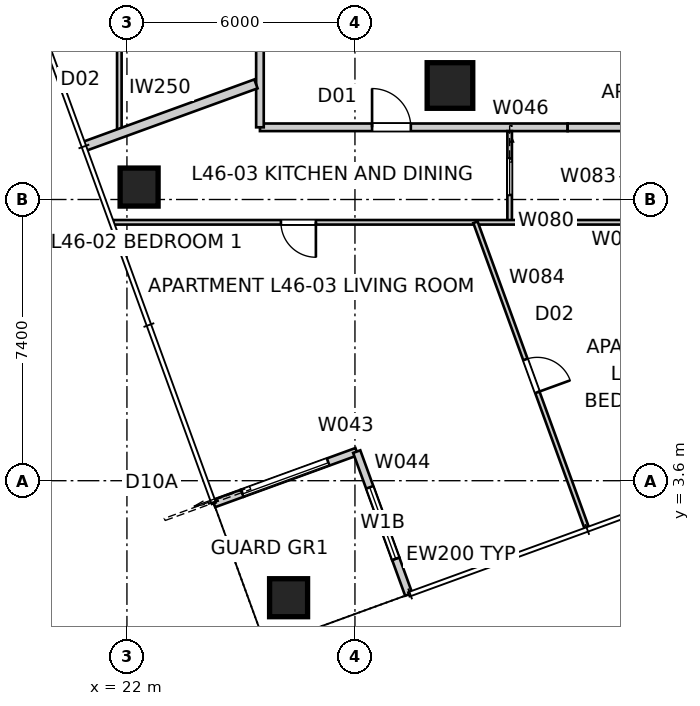
"""IFC4 building model, lengths in metres.
Left out: names, types, materials, properties, quantities, classifications, styles, units other than length and angle.
Written with IfcOpenShell. Run it as: python <this file> out.ifc"""

import sys

from ifc_helpers import new_model, si_unit, direction, frame, frame_2d, origin, origin_2d, place, context, subcontext, project, spatial, rectangle, extrude, element, fill, save


model = new_model("IFC4")
c1 = context("Model", 3, precision=1e-05, world=origin(), true_north=direction((0.0, 1.0)))
c2 = subcontext(c1, "Body", "Model", "MODEL_VIEW")
j1 = project(units=[si_unit("LENGTHUNIT", "METRE"), si_unit("PLANEANGLEUNIT", "RADIAN")], contexts=[c1])
p1 = place(None, origin())
s1 = spatial("IfcSite", under=j1, at=p1, CompositionType="ELEMENT")
p2 = place(p1, origin())
s2 = spatial("IfcBuilding", under=s1, at=p2, CompositionType="ELEMENT")
p3 = place(p2, frame((0.0, 0.0, 167.6)))
s3 = spatial("IfcBuildingStorey", under=s2, at=p3, CompositionType="ELEMENT", Elevation=167.6)
for number, where, z_axis, x_axis in (
    (1, (26.253, 0.521, 0.0), (0.0, 0.0, 1.0), (1.0, 0.0, 0.0)),
    (2, (22.32, 11.327, 0.0), (0.0, 0.0, 1.0), (1.0, 0.0, 0.0)),
):
    element("IfcColumn", number, at=place(p3, frame(where, z_axis=z_axis, x_axis=x_axis)), inside=s3, PredefinedType="COLUMN", context=c2, shape_type="SweptSolid", body=[
        extrude(rectangle(XDim=1.0, YDim=1.0, at=origin_2d()), origin(), (0.0, 0.0, 1.0), 3.2),
    ])
p4 = place(p3, frame((30.5, 14.0, 0.0), z_axis=(0.0, 0.0, 1.0), x_axis=(1.0, 0.0, 0.0)))
e3 = element("IfcColumn", 3, at=p4, inside=s3, PredefinedType="COLUMN", context=c2, shape_type="SweptSolid", body=[
    extrude(rectangle(XDim=1.2, YDim=1.2, at=origin_2d()), origin(), (0.0, 0.0, 1.0), 3.4),
])
p5 = place(p3, frame((24.288, 2.998, 0.0), z_axis=(0.0, 0.0, 1.0), x_axis=(0.939659694648, 0.342110593602, 0.0)))
e4 = element("IfcWall", 4, at=p5, inside=s3, PredefinedType="SOLIDWALL", context=c2, shape_type="SweptSolid", body=[
    extrude(rectangle(XDim=0.8, YDim=0.2, at=frame_2d((0.4, 0.0))), origin(), (0.0, 0.0, 1.0), 3.2),
])
p6 = place(p3, frame((25.04, 3.271, 0.0), z_axis=(0.0, 0.0, 1.0), x_axis=(0.939693144909, 0.342018703306, 0.0)))
e5 = element("IfcWall", 5, at=p6, inside=s3, PredefinedType="SOLIDWALL", context=c2, shape_type="SweptSolid", body=[
    extrude(rectangle(XDim=3.2, YDim=0.2, at=frame_2d((1.6, 0.0))), origin(), (0.0, 0.0, 1.0), 2.588),
])
p7 = place(p6, origin())
e6 = element("IfcOpeningElement", 6, at=p7, cuts=e5, PredefinedType="OPENING", context=c2, shape_type="SweptSolid", body=[
    extrude(rectangle(XDim=2.4, YDim=2.1, at=frame_2d((1.2, 1.05))), frame((0.0, 0.11, 0.0), z_axis=(0.0, -1.0, 0.0), x_axis=(1.0, 0.0, 0.0)), (0.0, 0.0, 1.0), 0.22),
])
p8 = place(p3, frame((28.047, 4.366, 0.0), z_axis=(0.0, 0.0, 1.0), x_axis=(0.341965219194, -0.939712609717, 0.0)))
e7 = element("IfcWall", 7, at=p8, inside=s3, PredefinedType="SOLIDWALL", context=c2, shape_type="SweptSolid", body=[
    extrude(rectangle(XDim=3.0, YDim=0.2, at=frame_2d((1.5, 0.0))), origin(), (0.0, 0.0, 1.0), 2.588),
])
p9 = place(p8, frame((1.0, 0.0, 0.4)))
e8 = element("IfcOpeningElement", 8, at=p9, cuts=e7, PredefinedType="OPENING", context=c2, shape_type="SweptSolid", body=[
    extrude(rectangle(XDim=2.0, YDim=1.8, at=frame_2d((1.0, 0.9))), frame((0.0, 0.11, 0.0), z_axis=(0.0, -1.0, 0.0), x_axis=(1.0, 0.0, 0.0)), (0.0, 0.0, 1.0), 0.22),
])
p10 = place(p3, frame((29.073, 1.547, 0.0), z_axis=(0.0, 0.0, 1.0), x_axis=(0.342037080957, -0.939686455819, 0.0)))
e9 = element("IfcWall", 9, at=p10, inside=s3, PredefinedType="SOLIDWALL", context=c2, shape_type="SweptSolid", body=[
    extrude(rectangle(XDim=1.0, YDim=0.2, at=frame_2d((0.5, 0.0))), origin(), (0.0, 0.0, 1.0), 3.2),
])
p11 = place(p3, frame((25.5, 12.9, 0.0), z_axis=(0.0, 0.0, 1.0), x_axis=(1.0, 0.0, 0.0)))
e10 = element("IfcWall", 10, at=p11, inside=s3, PredefinedType="PARTITIONING", context=c2, shape_type="SweptSolid", body=[
    extrude(rectangle(XDim=8.097, YDim=0.2, at=frame_2d((4.048, 0.0))), origin(), (0.0, 0.0, 1.0), 3.2),
])
p12 = place(p11, frame((2.95, 0.0, 0.0)))
e11 = element("IfcOpeningElement", 11, at=p12, cuts=e10, PredefinedType="OPENING", context=c2, shape_type="SweptSolid", body=[
    extrude(rectangle(XDim=1.02, YDim=2.34, at=frame_2d((0.51, 1.17))), frame((0.0, 0.11, 0.0), z_axis=(0.0, -1.0, 0.0), x_axis=(1.0, 0.0, 0.0)), (0.0, 0.0, 1.0), 0.22),
])
p13 = place(p3, frame((33.597, 12.9, 0.0), z_axis=(0.0, 0.0, 1.0), x_axis=(1.0, 0.0, 0.0)))
e12 = element("IfcWall", 12, at=p13, inside=s3, PredefinedType="PARTITIONING", context=c2, shape_type="SweptSolid", body=[
    extrude(rectangle(XDim=1.873, YDim=0.2, at=frame_2d((0.937, 0.0))), origin(), (0.0, 0.0, 1.0), 2.2),
])
p14 = place(p3, frame((25.5, 46.7, 0.0), z_axis=(0.0, 0.0, 1.0), x_axis=(0.0, -1.0, 0.0)))
e13 = element("IfcWall", 13, at=p14, inside=s3, PredefinedType="PARTITIONING", context=c2, shape_type="SweptSolid", body=[
    extrude(rectangle(XDim=33.8, YDim=0.2, at=frame_2d((16.9, 0.0))), origin(), (0.0, 0.0, 1.0), 3.2),
])
p15 = place(p14, frame((28.951, 0.0, 0.0)))
e14 = element("IfcOpeningElement", 14, at=p15, cuts=e13, PredefinedType="OPENING", context=c2, shape_type="SweptSolid", body=[
    extrude(rectangle(XDim=1.02, YDim=2.34, at=frame_2d((0.51, 1.17))), frame((0.0, 0.11, 0.0), z_axis=(0.0, -1.0, 0.0), x_axis=(1.0, 0.0, 0.0)), (0.0, 0.0, 1.0), 0.22),
])
p16 = place(p14, frame((13.881, 0.0, 0.0)))
e15 = element("IfcOpeningElement", 15, at=p16, cuts=e13, PredefinedType="OPENING", context=c2, shape_type="SweptSolid", body=[
    extrude(rectangle(XDim=1.02, YDim=2.34, at=frame_2d((0.51, 1.17))), frame((0.0, 0.11, 0.0), z_axis=(0.0, -1.0, 0.0), x_axis=(1.0, 0.0, 0.0)), (0.0, 0.0, 1.0), 0.22),
])
p17 = place(p14, frame((1.97, 0.0, 0.0)))
e16 = element("IfcOpeningElement", 16, at=p17, cuts=e13, PredefinedType="OPENING", context=c2, shape_type="SweptSolid", body=[
    extrude(rectangle(XDim=1.02, YDim=2.34, at=frame_2d((0.51, 1.17))), frame((0.0, 0.11, 0.0), z_axis=(0.0, -1.0, 0.0), x_axis=(1.0, 0.0, 0.0)), (0.0, 0.0, 1.0), 0.22),
])
p18 = place(p3, frame((20.868, 12.395, 0.0), z_axis=(0.0, 0.0, 1.0), x_axis=(0.939677962656, 0.342060413521, 0.0)))
e17 = element("IfcWall", 17, at=p18, inside=s3, PredefinedType="PARTITIONING", context=c2, shape_type="SweptSolid", body=[
    extrude(rectangle(XDim=4.818, YDim=0.25, at=frame_2d((2.409, 0.0))), origin(), (0.0, 0.0, 1.0), 3.2),
])
p19 = place(p3, frame((21.8, 12.734, 0.0), z_axis=(0.0, 0.0, 1.0), x_axis=(0.0, 1.0, 0.0)))
e18 = element("IfcWall", 18, at=p19, inside=s3, PredefinedType="PARTITIONING", context=c2, shape_type="SweptSolid", body=[
    extrude(rectangle(XDim=29.357, YDim=0.12, at=frame_2d((14.678, 0.0))), origin(), (0.0, 0.0, 1.0), 3.2),
])
p20 = place(p19, frame((2.227, 0.0, 0.0)))
e19 = element("IfcOpeningElement", 19, at=p20, cuts=e18, PredefinedType="OPENING", context=c2, shape_type="SweptSolid", body=[
    extrude(rectangle(XDim=0.92, YDim=2.34, at=frame_2d((0.46, 1.17))), frame((0.0, 0.07, 0.0), z_axis=(0.0, -1.0, 0.0), x_axis=(1.0, 0.0, 0.0)), (0.0, 0.0, 1.0), 0.14),
])
p21 = place(p19, frame((5.996, 0.0, 0.0)))
e20 = element("IfcOpeningElement", 20, at=p21, cuts=e18, PredefinedType="OPENING", context=c2, shape_type="SweptSolid", body=[
    extrude(rectangle(XDim=0.92, YDim=2.34, at=frame_2d((0.46, 1.17))), frame((0.0, 0.07, 0.0), z_axis=(0.0, -1.0, 0.0), x_axis=(1.0, 0.0, 0.0)), (0.0, 0.0, 1.0), 0.14),
])
p22 = place(p19, frame((18.415, 0.0, 0.0)))
e21 = element("IfcOpeningElement", 21, at=p22, cuts=e18, PredefinedType="OPENING", context=c2, shape_type="SweptSolid", body=[
    extrude(rectangle(XDim=0.92, YDim=2.34, at=frame_2d((0.46, 1.17))), frame((0.0, 0.07, 0.0), z_axis=(0.0, -1.0, 0.0), x_axis=(1.0, 0.0, 0.0)), (0.0, 0.0, 1.0), 0.14),
])
p23 = place(p19, frame((26.769, 0.0, 0.0)))
e22 = element("IfcOpeningElement", 22, at=p23, cuts=e18, PredefinedType="OPENING", context=c2, shape_type="SweptSolid", body=[
    extrude(rectangle(XDim=0.96, YDim=2.1, at=frame_2d((0.48, 1.05))), frame((0.0, 0.07, 0.0), z_axis=(0.0, -1.0, 0.0), x_axis=(1.0, 0.0, 0.0)), (0.0, 0.0, 1.0), 0.14),
])
p24 = place(p3, frame((32.071, 12.8, 0.0), z_axis=(0.0, 0.0, 1.0), x_axis=(0.0, -1.0, 0.0)))
e23 = element("IfcWall", 23, at=p24, inside=s3, PredefinedType="PARTITIONING", context=c2, shape_type="SweptSolid", body=[
    extrude(rectangle(XDim=2.4, YDim=0.12, at=frame_2d((1.2, 0.0))), origin(), (0.0, 0.0, 1.0), 3.2),
])
p25 = place(p24, frame((0.72, 0.0, 0.0)))
e24 = element("IfcOpeningElement", 24, at=p25, cuts=e23, PredefinedType="OPENING", context=c2, shape_type="SweptSolid", body=[
    extrude(rectangle(XDim=0.96, YDim=2.1, at=frame_2d((0.48, 1.05))), frame((0.0, 0.07, 0.0), z_axis=(0.0, -1.0, 0.0), x_axis=(1.0, 0.0, 0.0)), (0.0, 0.0, 1.0), 0.14),
])
p26 = place(p3, frame((56.281, 10.4, 0.0), z_axis=(0.0, 0.0, 1.0), x_axis=(-1.0, 0.0, 0.0)))
e25 = element("IfcWall", 25, at=p26, inside=s3, PredefinedType="PARTITIONING", context=c2, shape_type="SweptSolid", body=[
    extrude(rectangle(XDim=34.647, YDim=0.12, at=frame_2d((17.324, 0.0))), origin(), (0.0, 0.0, 1.0), 3.2),
])
p27 = place(p26, frame((29.309, 0.0, 0.0)))
e26 = element("IfcOpeningElement", 26, at=p27, cuts=e25, PredefinedType="OPENING", context=c2, shape_type="SweptSolid", body=[
    extrude(rectangle(XDim=0.92, YDim=2.34, at=frame_2d((0.46, 1.17))), frame((0.0, 0.07, 0.0), z_axis=(0.0, -1.0, 0.0), x_axis=(1.0, 0.0, 0.0)), (0.0, 0.0, 1.0), 0.14),
])
p28 = place(p26, frame((1.632, 0.0, 0.0)))
e27 = element("IfcOpeningElement", 27, at=p28, cuts=e25, PredefinedType="OPENING", context=c2, shape_type="SweptSolid", body=[
    extrude(rectangle(XDim=0.92, YDim=2.1, at=frame_2d((0.46, 1.05))), frame((0.0, 0.07, 0.0), z_axis=(0.0, -1.0, 0.0), x_axis=(1.0, 0.0, 0.0)), (0.0, 0.0, 1.0), 0.14),
])
p29 = place(p26, frame((16.938, 0.0, 0.0)))
e28 = element("IfcOpeningElement", 28, at=p29, cuts=e25, PredefinedType="OPENING", context=c2, shape_type="SweptSolid", body=[
    extrude(rectangle(XDim=0.96, YDim=2.1, at=frame_2d((0.48, 1.05))), frame((0.0, 0.07, 0.0), z_axis=(0.0, -1.0, 0.0), x_axis=(1.0, 0.0, 0.0)), (0.0, 0.0, 1.0), 0.14),
])
p30 = place(p26, frame((11.4, 0.0, 0.0)))
e29 = element("IfcOpeningElement", 29, at=p30, cuts=e25, PredefinedType="OPENING", context=c2, shape_type="SweptSolid", body=[
    extrude(rectangle(XDim=0.96, YDim=2.1, at=frame_2d((0.48, 1.05))), frame((0.0, 0.07, 0.0), z_axis=(0.0, -1.0, 0.0), x_axis=(1.0, 0.0, 0.0)), (0.0, 0.0, 1.0), 0.14),
])
p31 = place(p3, frame((31.171, 10.4, 0.0), z_axis=(0.0, 0.0, 1.0), x_axis=(0.34202238111, -0.939691806296, 0.0)))
e30 = element("IfcWall", 30, at=p31, inside=s3, PredefinedType="PARTITIONING", context=c2, shape_type="SweptSolid", body=[
    extrude(rectangle(XDim=8.562, YDim=0.12, at=frame_2d((4.281, 0.0))), origin(), (0.0, 0.0, 1.0), 3.2),
])
p32 = place(p31, frame((3.841, 0.0, 0.0)))
e31 = element("IfcOpeningElement", 31, at=p32, cuts=e30, PredefinedType="OPENING", context=c2, shape_type="SweptSolid", body=[
    extrude(rectangle(XDim=0.92, YDim=2.34, at=frame_2d((0.46, 1.17))), frame((0.0, 0.07, 0.0), z_axis=(0.0, -1.0, 0.0), x_axis=(1.0, 0.0, 0.0)), (0.0, 0.0, 1.0), 0.14),
])
p33 = place(p7, origin())
e32 = element("IfcDoor", 32, at=p33, inside=s3, OperationType="SLIDING_TO_LEFT", PredefinedType="DOOR", context=c2, shape_type="SweptSolid", body=[
    extrude(rectangle(XDim=2.4, YDim=2.1, at=frame_2d((1.2, 1.05))), frame((0.0, 0.025, 0.0), z_axis=(0.0, -1.0, 0.0), x_axis=(1.0, 0.0, 0.0)), (0.0, 0.0, 1.0), 0.05),
])
fill(e6, e32)
p34 = place(p9, origin())
e33 = element("IfcWindow", 33, at=p34, inside=s3, PartitioningType="SINGLE_PANEL", PredefinedType="WINDOW", context=c2, shape_type="SweptSolid", body=[
    extrude(rectangle(XDim=2.0, YDim=1.8, at=frame_2d((1.0, 0.9))), frame((0.0, 0.03, 0.0), z_axis=(0.0, -1.0, 0.0), x_axis=(1.0, 0.0, 0.0)), (0.0, 0.0, 1.0), 0.06),
])
fill(e8, e33)
p35 = place(p12, origin())
e34 = element("IfcDoor", 34, at=p35, inside=s3, OperationType="SINGLE_SWING_LEFT", PredefinedType="DOOR", context=c2, shape_type="SweptSolid", body=[
    extrude(rectangle(XDim=1.02, YDim=2.34, at=frame_2d((0.51, 1.17))), frame((0.0, 0.025, 0.0), z_axis=(0.0, -1.0, 0.0), x_axis=(1.0, 0.0, 0.0)), (0.0, 0.0, 1.0), 0.05),
])
fill(e11, e34)
p36 = place(p27, origin())
e35 = element("IfcDoor", 35, at=p36, inside=s3, OperationType="SINGLE_SWING_LEFT", PredefinedType="DOOR", context=c2, shape_type="SweptSolid", body=[
    extrude(rectangle(XDim=0.92, YDim=2.34, at=frame_2d((0.46, 1.17))), frame((0.0, 0.025, 0.0), z_axis=(0.0, -1.0, 0.0), x_axis=(1.0, 0.0, 0.0)), (0.0, 0.0, 1.0), 0.05),
])
fill(e26, e35)
p37 = place(p25, origin())
e36 = element("IfcDoor", 36, at=p37, inside=s3, OperationType="SLIDING_TO_LEFT", PredefinedType="DOOR", context=c2, shape_type="SweptSolid", body=[
    extrude(rectangle(XDim=0.96, YDim=2.1, at=frame_2d((0.48, 1.05))), frame((0.0, 0.025, 0.0), z_axis=(0.0, -1.0, 0.0), x_axis=(1.0, 0.0, 0.0)), (0.0, 0.0, 1.0), 0.05),
])
fill(e24, e36)
p38 = place(p32, origin())
e37 = element("IfcDoor", 37, at=p38, inside=s3, OperationType="SINGLE_SWING_RIGHT", PredefinedType="DOOR", context=c2, shape_type="SweptSolid", body=[
    extrude(rectangle(XDim=0.92, YDim=2.34, at=frame_2d((0.46, 1.17))), frame((0.0, 0.025, 0.0), z_axis=(0.0, -1.0, 0.0), x_axis=(1.0, 0.0, 0.0)), (0.0, 0.0, 1.0), 0.05),
])
fill(e31, e37)
save(model, sys.argv[1])
